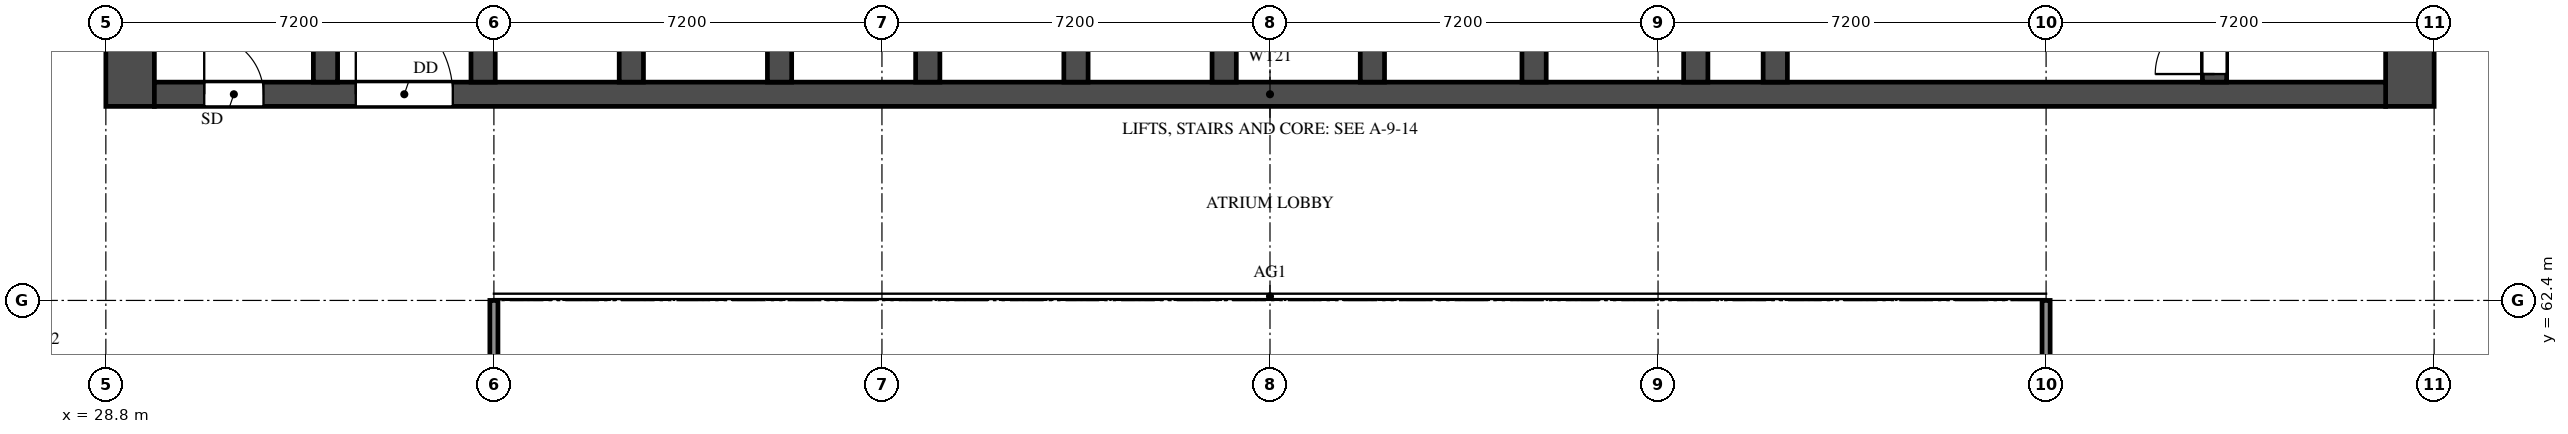
"""IFC4 building model, lengths in metres.
Left out: names, types, materials, properties, quantities, classifications, styles, units other than length and angle.
Written with IfcOpenShell. Run it as: python <this file> out.ifc"""

import sys

from ifc_helpers import new_model, si_unit, direction, frame, frame_2d, origin, place, context, subcontext, project, spatial, rectangle, extrude, element, fill, save


model = new_model("IFC4")
c1 = context("Model", 3, precision=1e-05, world=origin(), true_north=direction((0.0, 1.0)))
c2 = subcontext(c1, "Body", "Model", "MODEL_VIEW")
j1 = project(units=[si_unit("LENGTHUNIT", "METRE"), si_unit("PLANEANGLEUNIT", "RADIAN")], contexts=[c1])
p1 = place(None, origin())
s1 = spatial("IfcSite", under=j1, at=p1, CompositionType="ELEMENT")
p2 = place(p1, origin())
s2 = spatial("IfcBuilding", under=s1, at=p2, CompositionType="ELEMENT")
p3 = place(p2, frame((0.0, 0.0, 97.0)))
s3 = spatial("IfcBuildingStorey", under=s2, at=p3, CompositionType="ELEMENT", Elevation=97.0)
for number, where, z_axis, x_axis in (
    (1, (29.25, 66.0, 0.0), (0.0, 0.0, 1.0), (0.0, 1.0, 0.0)),
    (2, (71.55, 66.0, 0.0), (0.0, 0.0, 1.0), (0.0, 1.0, 0.0)),
):
    element("IfcWall", number, at=place(p3, frame(where, z_axis=z_axis, x_axis=x_axis)), inside=s3, PredefinedType="SHEAR", context=c2, shape_type="SweptSolid", body=[
        extrude(rectangle(XDim=12.0, YDim=0.9, at=frame_2d((6.0, 0.0))), origin(), (0.0, 0.0, 1.0), 3.18),
    ])
p4 = place(p3, frame((29.7, 66.225, 0.0), z_axis=(0.0, 0.0, 1.0), x_axis=(1.0, 0.0, 0.0)))
e3 = element("IfcWall", 3, at=p4, inside=s3, PredefinedType="SHEAR", context=c2, shape_type="SweptSolid", body=[
    extrude(rectangle(XDim=41.4, YDim=0.45, at=frame_2d((20.7, 0.0))), origin(), (0.0, 0.0, 1.0), 3.18),
])
p5 = place(p4, frame((0.925, 0.0, 0.0)))
e4 = element("IfcOpeningElement", 4, at=p5, cuts=e3, PredefinedType="OPENING", context=c2, shape_type="SweptSolid", body=[
    extrude(rectangle(XDim=1.1, YDim=2.1, at=frame_2d((0.55, 1.05))), frame((0.0, 0.235, 0.0), z_axis=(0.0, -1.0, 0.0), x_axis=(1.0, 0.0, 0.0)), (0.0, 0.0, 1.0), 0.47),
])
p6 = place(p4, frame((3.738, 0.0, 0.0)))
e5 = element("IfcOpeningElement", 5, at=p6, cuts=e3, PredefinedType="OPENING", context=c2, shape_type="SweptSolid", body=[
    extrude(rectangle(XDim=1.8, YDim=2.1, at=frame_2d((0.9, 1.05))), frame((0.0, 0.235, 0.0), z_axis=(0.0, -1.0, 0.0), x_axis=(1.0, 0.0, 0.0)), (0.0, 0.0, 1.0), 0.47),
])
p7 = place(p3, frame((32.875, 66.45, 0.0), z_axis=(0.0, 0.0, 1.0), x_axis=(0.0, 1.0, 0.0)))
e6 = element("IfcWall", 6, at=p7, inside=s3, PredefinedType="SHEAR", context=c2, shape_type="SweptSolid", body=[
    extrude(rectangle(XDim=10.65, YDim=0.45, at=frame_2d((5.325, 0.0))), origin(), (0.0, 0.0, 1.0), 3.18),
])
p8 = place(p3, frame((67.925, 66.45, 0.0), z_axis=(0.0, 0.0, 1.0), x_axis=(0.0, 1.0, 0.0)))
e7 = element("IfcWall", 7, at=p8, inside=s3, PredefinedType="SHEAR", context=c2, shape_type="SweptSolid", body=[
    extrude(rectangle(XDim=10.65, YDim=0.45, at=frame_2d((5.325, 0.0))), origin(), (0.0, 0.0, 1.0), 3.18),
])
p9 = place(p8, frame((0.15, 0.0, 0.0)))
e8 = element("IfcOpeningElement", 8, at=p9, cuts=e7, PredefinedType="OPENING", context=c2, shape_type="SweptSolid", body=[
    extrude(rectangle(XDim=1.1, YDim=2.1, at=frame_2d((0.55, 1.05))), frame((0.0, 0.235, 0.0), z_axis=(0.0, -1.0, 0.0), x_axis=(1.0, 0.0, 0.0)), (0.0, 0.0, 1.0), 0.47),
])
p10 = place(p3, frame((59.775, 66.45, 0.0), z_axis=(0.0, 0.0, 1.0), x_axis=(0.0, 1.0, 0.0)))
e9 = element("IfcWall", 9, at=p10, inside=s3, PredefinedType="SHEAR", context=c2, shape_type="SweptSolid", body=[
    extrude(rectangle(XDim=6.025, YDim=0.45, at=frame_2d((3.013, 0.0))), origin(), (0.0, 0.0, 1.0), 3.18),
])
p11 = place(p10, frame((3.85, 0.0, 0.0)))
e10 = element("IfcOpeningElement", 10, at=p11, cuts=e9, PredefinedType="OPENING", context=c2, shape_type="SweptSolid", body=[
    extrude(rectangle(XDim=1.2, YDim=2.1, at=frame_2d((0.6, 1.05))), frame((0.0, 0.235, 0.0), z_axis=(0.0, -1.0, 0.0), x_axis=(1.0, 0.0, 0.0)), (0.0, 0.0, 1.0), 0.47),
])
for number, where, z_axis, x_axis in (
    (11, (35.8, 66.45, 0.0), (0.0, 0.0, 1.0), (0.0, 1.0, 0.0)),
    (12, (38.55, 66.45, 0.0), (0.0, 0.0, 1.0), (0.0, 1.0, 0.0)),
    (13, (41.3, 66.45, 0.0), (0.0, 0.0, 1.0), (0.0, 1.0, 0.0)),
    (14, (44.05, 66.45, 0.0), (0.0, 0.0, 1.0), (0.0, 1.0, 0.0)),
    (15, (46.8, 66.45, 0.0), (0.0, 0.0, 1.0), (0.0, 1.0, 0.0)),
    (16, (49.55, 66.45, 0.0), (0.0, 0.0, 1.0), (0.0, 1.0, 0.0)),
    (17, (52.3, 66.45, 0.0), (0.0, 0.0, 1.0), (0.0, 1.0, 0.0)),
    (18, (55.3, 66.45, 0.0), (0.0, 0.0, 1.0), (0.0, 1.0, 0.0)),
    (19, (58.3, 66.45, 0.0), (0.0, 0.0, 1.0), (0.0, 1.0, 0.0)),
):
    element("IfcWall", number, at=place(p3, frame(where, z_axis=z_axis, x_axis=x_axis)), inside=s3, PredefinedType="SHEAR", context=c2, shape_type="SweptSolid", body=[
        extrude(rectangle(XDim=2.425, YDim=0.45, at=frame_2d((1.212, 0.0))), origin(), (0.0, 0.0, 1.0), 3.18),
    ])
for number, where, z_axis, x_axis in (
    (20, (36.0, 48.0, 0.0), (0.0, 0.0, 1.0), (0.0, 1.0, 0.0)),
    (21, (64.8, 48.0, 0.0), (0.0, 0.0, 1.0), (0.0, 1.0, 0.0)),
):
    element("IfcWall", number, at=place(p3, frame(where, z_axis=z_axis, x_axis=x_axis)), inside=s3, PredefinedType="SOLIDWALL", context=c2, shape_type="SweptSolid", body=[
        extrude(rectangle(XDim=14.4, YDim=0.15, at=frame_2d((7.2, 0.0))), origin(), (0.0, 0.0, 1.0), 2.28),
    ])
p12 = place(p5, origin())
e22 = element("IfcDoor", 22, at=p12, inside=s3, OperationType="SINGLE_SWING_LEFT", PredefinedType="DOOR", context=c2, shape_type="SweptSolid", body=[
    extrude(rectangle(XDim=1.1, YDim=2.1, at=frame_2d((0.55, 1.05))), frame((0.0, 0.025, 0.0), z_axis=(0.0, -1.0, 0.0), x_axis=(1.0, 0.0, 0.0)), (0.0, 0.0, 1.0), 0.05),
])
fill(e4, e22)
p13 = place(p9, origin())
e23 = element("IfcDoor", 23, at=p13, inside=s3, OperationType="SINGLE_SWING_LEFT", PredefinedType="DOOR", context=c2, shape_type="SweptSolid", body=[
    extrude(rectangle(XDim=1.1, YDim=2.1, at=frame_2d((0.55, 1.05))), frame((0.0, 0.025, 0.0), z_axis=(0.0, -1.0, 0.0), x_axis=(1.0, 0.0, 0.0)), (0.0, 0.0, 1.0), 0.05),
])
fill(e8, e23)
p14 = place(p6, origin())
e24 = element("IfcDoor", 24, at=p14, inside=s3, OperationType="DOUBLE_DOOR_SINGLE_SWING", PredefinedType="DOOR", context=c2, shape_type="SweptSolid", body=[
    extrude(rectangle(XDim=1.8, YDim=2.1, at=frame_2d((0.9, 1.05))), frame((0.0, 0.025, 0.0), z_axis=(0.0, -1.0, 0.0), x_axis=(1.0, 0.0, 0.0)), (0.0, 0.0, 1.0), 0.05),
])
fill(e5, e24)
save(model, sys.argv[1])
